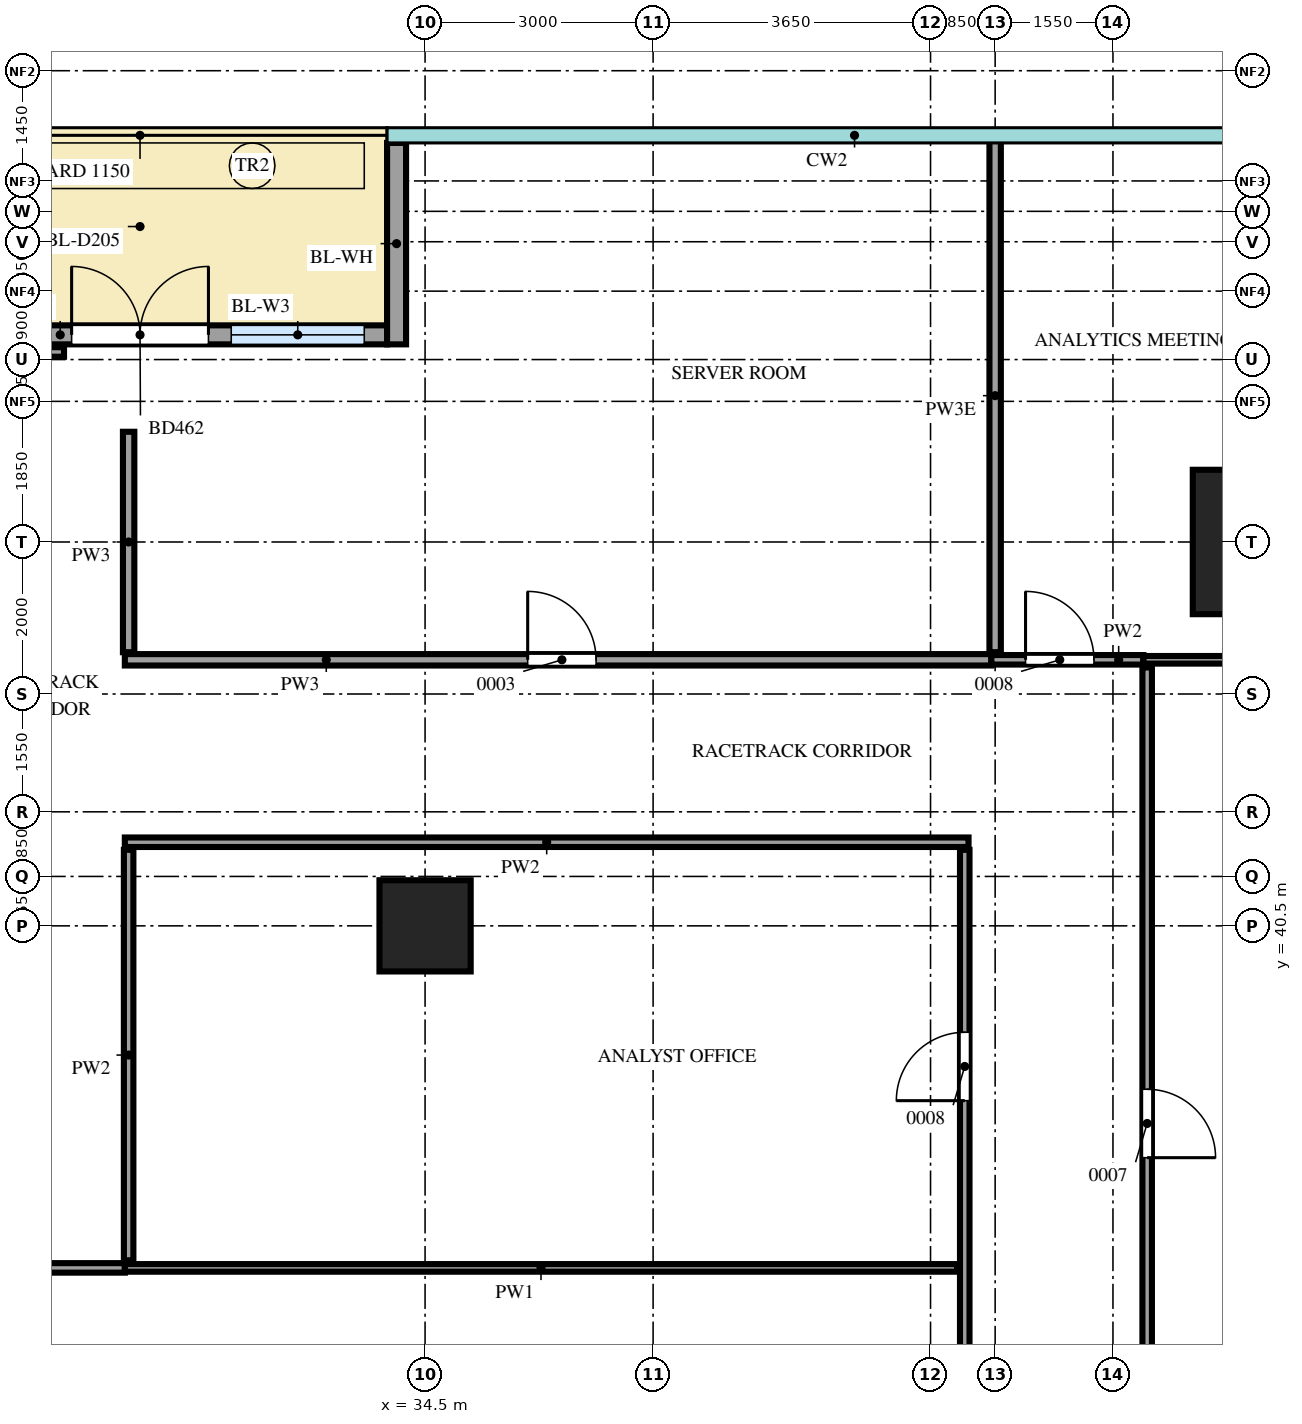
"""IFC4 building model, lengths in metres.
Left out: names, types, materials, properties, quantities, classifications, styles, units other than length and angle.
Written with IfcOpenShell. Run it as: python <this file> out.ifc"""

import sys

from ifc_helpers import new_model, si_unit, direction, frame, frame_2d, origin, origin_2d, place, context, subcontext, project, spatial, rectangle, extrude, source, transform, mapped, element, fill, save


model = new_model("IFC4")
c1 = context("Model", 3, precision=1e-05, world=origin(), true_north=direction((0.0, 1.0)))
c2 = subcontext(c1, "Body", "Model", "MODEL_VIEW")
j1 = project(units=[si_unit("LENGTHUNIT", "METRE"), si_unit("PLANEANGLEUNIT", "RADIAN")], contexts=[c1])
p1 = place(None, origin())
s1 = spatial("IfcSite", under=j1, at=p1, CompositionType="ELEMENT")
p2 = place(p1, origin())
s2 = spatial("IfcBuilding", under=s1, at=p2, CompositionType="ELEMENT")
p3 = place(p2, frame((0.0, 0.0, 208.7)))
s3 = spatial("IfcBuildingStorey", under=s2, at=p3, CompositionType="ELEMENT", Elevation=208.7)
m1 = source(origin(), c2, "Body", "SweptSolid", [
    extrude(rectangle(XDim=1.9, YDim=1.9, at=origin_2d()), origin(), (0.0, 0.0, 1.0), 4.0),
])
p4 = place(p3, frame((45.55, 45.55, 0.0), z_axis=(0.0, 0.0, 1.0), x_axis=(1.0, 0.0, 0.0)))
e1 = element("IfcColumn", 1, at=p4, inside=s3, PredefinedType="COLUMN", context=c2, shape_type="MappedRepresentation", body=[
    mapped(m1, transform((0.0, 0.0, 0.0))),
])
m2 = source(origin(), c2, "Body", "SweptSolid", [
    extrude(rectangle(XDim=1.2, YDim=1.2, at=origin_2d()), origin(), (0.0, 0.0, 1.0), 3.75),
])
p5 = place(p3, frame((34.5, 40.5, 0.0), z_axis=(0.0, 0.0, 1.0), x_axis=(1.0, 0.0, 0.0)))
e2 = element("IfcColumn", 2, at=p5, inside=s3, PredefinedType="COLUMN", context=c2, shape_type="MappedRepresentation", body=[
    mapped(m2, transform((0.0, 0.0, 0.0))),
])
m3 = source(origin(), c2, "Body", "SweptSolid", [
    extrude(rectangle(XDim=6.5, YDim=0.25, at=frame_2d((3.25, 0.0))), origin(), (0.0, 0.0, 1.0), 3.75),
])
p6 = place(p3, frame((27.5, 48.275, 0.0), z_axis=(0.0, 0.0, 1.0), x_axis=(1.0, 0.0, 0.0)))
e3 = element("IfcWall", 3, at=p6, inside=s3, PredefinedType="SOLIDWALL", context=c2, shape_type="MappedRepresentation", body=[
    mapped(m3, transform((0.0, 0.0, 0.0))),
])
m4 = source(origin(), c2, "Body", "SweptSolid", [
    extrude(rectangle(XDim=1.75, YDim=2.4, at=frame_2d((0.875, 1.2))), frame((0.0, 0.135, 0.0), z_axis=(0.0, -1.0, 0.0), x_axis=(1.0, 0.0, 0.0)), (0.0, 0.0, 1.0), 0.27),
])
p7 = place(p6, frame((0.3, 0.0, 0.0)))
e4 = element("IfcOpeningElement", 4, at=p7, cuts=e3, PredefinedType="OPENING", context=c2, shape_type="MappedRepresentation", body=[
    mapped(m4, transform((0.0, 0.0, 0.0))),
])
p8 = place(p6, frame((4.45, 0.0, 0.0)))
e5 = element("IfcOpeningElement", 5, at=p8, cuts=e3, PredefinedType="OPENING", context=c2, shape_type="MappedRepresentation", body=[
    mapped(m4, transform((0.0, 0.0, 0.0))),
])
m5 = source(origin(), c2, "Body", "SweptSolid", [
    extrude(rectangle(XDim=1.8, YDim=2.4, at=frame_2d((0.9, 1.2))), frame((0.0, 0.135, 0.0), z_axis=(0.0, -1.0, 0.0), x_axis=(1.0, 0.0, 0.0)), (0.0, 0.0, 1.0), 0.27),
])
p9 = place(p6, frame((2.35, 0.0, 0.0)))
e6 = element("IfcOpeningElement", 6, at=p9, cuts=e3, PredefinedType="OPENING", context=c2, shape_type="MappedRepresentation", body=[
    mapped(m5, transform((0.0, 0.0, 0.0))),
])
m6 = source(origin(), c2, "Body", "SweptSolid", [
    extrude(rectangle(XDim=2.65, YDim=0.25, at=frame_2d((1.325, 0.0))), origin(), (0.0, 0.0, 1.0), 3.25),
])
p10 = place(p3, frame((34.125, 50.8, 0.0), z_axis=(0.0, 0.0, 1.0), x_axis=(0.0, -1.0, 0.0)))
e7 = element("IfcWall", 7, at=p10, inside=s3, PredefinedType="SOLIDWALL", context=c2, shape_type="MappedRepresentation", body=[
    mapped(m6, transform((0.0, 0.0, 0.0))),
])
m7 = source(origin(), c2, "Body", "SweptSolid", [
    extrude(rectangle(XDim=33.8, YDim=0.125, at=frame_2d((16.9, 0.0))), origin(), (0.0, 0.0, 1.0), 3.8),
])
p11 = place(p3, frame((44.0, 10.1, 0.0), z_axis=(0.0, 0.0, 1.0), x_axis=(0.0, 1.0, 0.0)))
e8 = element("IfcWall", 8, at=p11, inside=s3, PredefinedType="PARTITIONING", context=c2, shape_type="MappedRepresentation", body=[
    mapped(m7, transform((0.0, 0.0, 0.0))),
])
m8 = source(origin(), c2, "Body", "SweptSolid", [
    extrude(rectangle(XDim=1.2, YDim=2.1, at=frame_2d((0.6, 1.05))), frame((0.0, 0.073, 0.0), z_axis=(0.0, -1.0, 0.0), x_axis=(1.0, 0.0, 0.0)), (0.0, 0.0, 1.0), 0.145),
])
p12 = place(p11, frame((12.75, 0.0, 0.0)))
e9 = element("IfcOpeningElement", 9, at=p12, cuts=e8, PredefinedType="OPENING", context=c2, shape_type="MappedRepresentation", body=[
    mapped(m8, transform((0.0, 0.0, 0.0))),
])
m9 = source(origin(), c2, "Body", "SweptSolid", [
    extrude(rectangle(XDim=0.9, YDim=2.1, at=frame_2d((0.45, 1.05))), frame((0.0, 0.073, 0.0), z_axis=(0.0, -1.0, 0.0), x_axis=(1.0, 0.0, 0.0)), (0.0, 0.0, 1.0), 0.145),
])
p13 = place(p11, frame((27.35, 0.0, 0.0)))
e10 = element("IfcOpeningElement", 10, at=p13, cuts=e8, PredefinedType="OPENING", context=c2, shape_type="MappedRepresentation", body=[
    mapped(m9, transform((0.0, 0.0, 0.0))),
])
m10 = source(origin(), c2, "Body", "SweptSolid", [
    extrude(rectangle(XDim=29.0, YDim=0.125, at=frame_2d((14.5, 0.0))), origin(), (0.0, 0.0, 1.0), 3.8),
])
p14 = place(p3, frame((41.6, 12.5, 0.0), z_axis=(0.0, 0.0, 1.0), x_axis=(0.0, 1.0, 0.0)))
e11 = element("IfcWall", 11, at=p14, inside=s3, PredefinedType="PARTITIONING", context=c2, shape_type="MappedRepresentation", body=[
    mapped(m10, transform((0.0, 0.0, 0.0))),
])
p15 = place(p14, frame((25.7, 0.0, 0.0)))
e12 = element("IfcOpeningElement", 12, at=p15, cuts=e11, PredefinedType="OPENING", context=c2, shape_type="MappedRepresentation", body=[
    mapped(m9, transform((0.0, 0.0, 0.0))),
])
m11 = source(origin(), c2, "Body", "SweptSolid", [
    extrude(rectangle(XDim=7.2, YDim=0.125, at=frame_2d((3.6, 0.0))), origin(), (0.0, 0.0, 1.0), 3.8),
])
p16 = place(p3, frame((23.35, 36.0, 0.0), z_axis=(0.0, 0.0, 1.0), x_axis=(1.0, 0.0, 0.0)))
e13 = element("IfcWall", 13, at=p16, inside=s3, PredefinedType="PARTITIONING", context=c2, shape_type="MappedRepresentation", body=[
    mapped(m11, transform((0.0, 0.0, 0.0))),
])
m12 = source(origin(), c2, "Body", "SweptSolid", [
    extrude(rectangle(XDim=10.95, YDim=0.1, at=frame_2d((5.475, 0.0))), origin(), (0.0, 0.0, 1.0), 3.8),
])
p17 = place(p3, frame((30.55, 36.0, 0.0), z_axis=(0.0, 0.0, 1.0), x_axis=(1.0, 0.0, 0.0)))
e14 = element("IfcWall", 14, at=p17, inside=s3, PredefinedType="PARTITIONING", context=c2, shape_type="MappedRepresentation", body=[
    mapped(m12, transform((0.0, 0.0, 0.0))),
])
m13 = source(origin(), c2, "Body", "SweptSolid", [
    extrude(rectangle(XDim=5.4, YDim=0.125, at=frame_2d((2.7, 0.0))), origin(), (0.0, 0.0, 1.0), 3.8),
])
p18 = place(p3, frame((30.6, 36.1, 0.0), z_axis=(0.0, 0.0, 1.0), x_axis=(0.0, 1.0, 0.0)))
e15 = element("IfcWall", 15, at=p18, inside=s3, PredefinedType="PARTITIONING", context=c2, shape_type="MappedRepresentation", body=[
    mapped(m13, transform((0.0, 0.0, 0.0))),
])
m14 = source(origin(), c2, "Body", "SweptSolid", [
    extrude(rectangle(XDim=11.1, YDim=0.125, at=frame_2d((5.55, 0.0))), origin(), (0.0, 0.0, 1.0), 3.8),
])
p19 = place(p3, frame((30.55, 41.6, 0.0), z_axis=(0.0, 0.0, 1.0), x_axis=(1.0, 0.0, 0.0)))
e16 = element("IfcWall", 16, at=p19, inside=s3, PredefinedType="PARTITIONING", context=c2, shape_type="MappedRepresentation", body=[
    mapped(m14, transform((0.0, 0.0, 0.0))),
])
m15 = source(origin(), c2, "Body", "SweptSolid", [
    extrude(rectangle(XDim=11.4, YDim=0.15, at=frame_2d((5.7, 0.0))), origin(), (0.0, 0.0, 1.0), 3.8),
])
p20 = place(p3, frame((30.55, 44.0, 0.0), z_axis=(0.0, 0.0, 1.0), x_axis=(1.0, 0.0, 0.0)))
e17 = element("IfcWall", 17, at=p20, inside=s3, PredefinedType="PARTITIONING", context=c2, shape_type="MappedRepresentation", body=[
    mapped(m15, transform((0.0, 0.0, 0.0))),
])
m16 = source(origin(), c2, "Body", "SweptSolid", [
    extrude(rectangle(XDim=0.9, YDim=2.1, at=frame_2d((0.45, 1.05))), frame((0.0, 0.085, 0.0), z_axis=(0.0, -1.0, 0.0), x_axis=(1.0, 0.0, 0.0)), (0.0, 0.0, 1.0), 0.17),
])
p21 = place(p20, frame((5.3, 0.0, 0.0)))
e18 = element("IfcOpeningElement", 18, at=p21, cuts=e17, PredefinedType="OPENING", context=c2, shape_type="MappedRepresentation", body=[
    mapped(m16, transform((0.0, 0.0, 0.0))),
])
m17 = source(origin(), c2, "Body", "SweptSolid", [
    extrude(rectangle(XDim=2.0, YDim=0.125, at=frame_2d((1.0, 0.0))), origin(), (0.0, 0.0, 1.0), 3.8),
])
p22 = place(p3, frame((41.95, 44.0, 0.0), z_axis=(0.0, 0.0, 1.0), x_axis=(1.0, 0.0, 0.0)))
e19 = element("IfcWall", 19, at=p22, inside=s3, PredefinedType="PARTITIONING", context=c2, shape_type="MappedRepresentation", body=[
    mapped(m17, transform((0.0, 0.0, 0.0))),
])
p23 = place(p22, frame((0.45, 0.0, 0.0)))
e20 = element("IfcOpeningElement", 20, at=p23, cuts=e19, PredefinedType="OPENING", context=c2, shape_type="MappedRepresentation", body=[
    mapped(m9, transform((0.0, 0.0, 0.0))),
])
m18 = source(origin(), c2, "Body", "SweptSolid", [
    extrude(rectangle(XDim=6.9, YDim=0.1, at=frame_2d((3.45, 0.0))), origin(), (0.0, 0.0, 1.0), 3.8),
])
p24 = place(p3, frame((43.95, 44.0, 0.0), z_axis=(0.0, 0.0, 1.0), x_axis=(1.0, 0.0, 0.0)))
e21 = element("IfcWall", 21, at=p24, inside=s3, PredefinedType="PARTITIONING", context=c2, shape_type="MappedRepresentation", body=[
    mapped(m18, transform((0.0, 0.0, 0.0))),
])
m19 = source(origin(), c2, "Body", "SweptSolid", [
    extrude(rectangle(XDim=2.9, YDim=0.15, at=frame_2d((1.45, 0.0))), origin(), (0.0, 0.0, 1.0), 3.8),
])
p25 = place(p3, frame((30.6, 44.1, 0.0), z_axis=(0.0, 0.0, 1.0), x_axis=(0.0, 1.0, 0.0)))
e22 = element("IfcWall", 22, at=p25, inside=s3, PredefinedType="PARTITIONING", context=c2, shape_type="MappedRepresentation", body=[
    mapped(m19, transform((0.0, 0.0, 0.0))),
])
m20 = source(origin(), c2, "Body", "SweptSolid", [
    extrude(rectangle(XDim=6.75, YDim=0.15, at=frame_2d((3.375, 0.0))), origin(), (0.0, 0.0, 1.0), 3.3),
])
p26 = place(p3, frame((42.0, 44.1, 0.0), z_axis=(0.0, 0.0, 1.0), x_axis=(0.0, 1.0, 0.0)))
e23 = element("IfcWall", 23, at=p26, inside=s3, PredefinedType="PARTITIONING", context=c2, shape_type="MappedRepresentation", body=[
    mapped(m20, transform((0.0, 0.0, 0.0))),
])
m21 = source(origin(), c2, "Body", "SweptSolid", [
    extrude(rectangle(XDim=13.0, YDim=0.125, at=frame_2d((6.5, 0.0))), origin(), (0.0, 0.0, 1.0), 3.8),
])
p27 = place(p3, frame((16.75, 48.05, 0.0), z_axis=(0.0, 0.0, 1.0), x_axis=(1.0, 0.0, 0.0)))
e24 = element("IfcWall", 24, at=p27, inside=s3, PredefinedType="PARTITIONING", context=c2, shape_type="MappedRepresentation", body=[
    mapped(m21, transform((0.0, 0.0, 0.0))),
])
p28 = place(p27, frame((7.7, 0.0, 0.0)))
e25 = element("IfcOpeningElement", 25, at=p28, cuts=e24, PredefinedType="OPENING", context=c2, shape_type="MappedRepresentation", body=[
    mapped(m9, transform((0.0, 0.0, 0.0))),
])
m22 = source(origin(), c2, "Body", "SweptSolid", [
    extrude(rectangle(XDim=1.75, YDim=2.4, at=frame_2d((0.875, 1.2))), frame((0.0, 0.03, 0.0), z_axis=(0.0, -1.0, 0.0), x_axis=(1.0, 0.0, 0.0)), (0.0, 0.0, 1.0), 0.06),
])
p29 = place(p8, origin())
e26 = element("IfcWindow", 26, at=p29, inside=s3, PartitioningType="SINGLE_PANEL", PredefinedType="WINDOW", context=c2, shape_type="MappedRepresentation", body=[
    mapped(m22, transform((0.0, 0.0, 0.0))),
])
fill(e5, e26)
m23 = source(origin(), c2, "Body", "SweptSolid", [
    extrude(rectangle(XDim=1.8, YDim=2.4, at=frame_2d((0.9, 1.2))), frame((0.0, 0.025, 0.0), z_axis=(0.0, -1.0, 0.0), x_axis=(1.0, 0.0, 0.0)), (0.0, 0.0, 1.0), 0.05),
])
p30 = place(p9, origin())
e27 = element("IfcDoor", 27, at=p30, inside=s3, OperationType="DOUBLE_DOOR_DOUBLE_SWING", PredefinedType="DOOR", context=c2, shape_type="MappedRepresentation", body=[
    mapped(m23, transform((0.0, 0.0, 0.0))),
])
fill(e6, e27)
m24 = source(origin(), c2, "Body", "SweptSolid", [
    extrude(rectangle(XDim=0.9, YDim=2.1, at=frame_2d((0.45, 1.05))), frame((0.0, 0.025, 0.0), z_axis=(0.0, -1.0, 0.0), x_axis=(1.0, 0.0, 0.0)), (0.0, 0.0, 1.0), 0.05),
])
p31 = place(p13, origin())
e28 = element("IfcDoor", 28, at=p31, inside=s3, OperationType="SINGLE_SWING_LEFT", PredefinedType="DOOR", context=c2, shape_type="MappedRepresentation", body=[
    mapped(m24, transform((0.0, 0.0, 0.0))),
])
fill(e10, e28)
p32 = place(p21, origin())
e29 = element("IfcDoor", 29, at=p32, inside=s3, OperationType="SINGLE_SWING_RIGHT", PredefinedType="DOOR", context=c2, shape_type="MappedRepresentation", body=[
    mapped(m24, transform((0.0, 0.0, 0.0))),
])
fill(e18, e29)
p33 = place(p23, origin())
e30 = element("IfcDoor", 30, at=p33, inside=s3, OperationType="SINGLE_SWING_RIGHT", PredefinedType="DOOR", context=c2, shape_type="MappedRepresentation", body=[
    mapped(m24, transform((0.0, 0.0, 0.0))),
])
fill(e20, e30)
p34 = place(p15, origin())
e31 = element("IfcDoor", 31, at=p34, inside=s3, OperationType="SINGLE_SWING_RIGHT", PredefinedType="DOOR", context=c2, shape_type="MappedRepresentation", body=[
    mapped(m24, transform((0.0, 0.0, 0.0))),
])
fill(e12, e31)
save(model, sys.argv[1])
